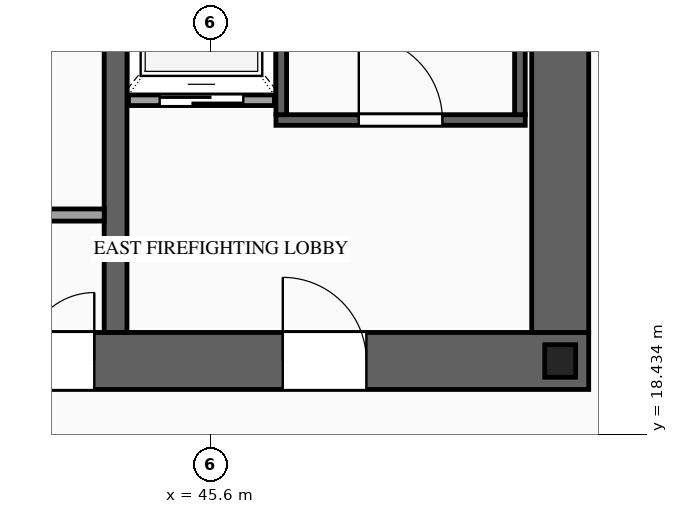
"""IFC4 building model, lengths in metres.
Left out: names, types, materials, properties, quantities, classifications, styles, units other than length and angle.
Written with IfcOpenShell. Run it as: python <this file> out.ifc"""

import sys

from ifc_helpers import new_model, si_unit, direction, frame, frame_2d, origin, origin_2d, place, context, subcontext, project, spatial, rectangle, i_section, extrude, source, transform, mapped, element, fill, save


model = new_model("IFC4")
c1 = context("Model", 3, precision=1e-05, world=origin(), true_north=direction((0.0, 1.0)))
c2 = subcontext(c1, "Body", "Model", "MODEL_VIEW")
j1 = project(units=[si_unit("LENGTHUNIT", "METRE"), si_unit("PLANEANGLEUNIT", "RADIAN")], contexts=[c1])
p1 = place(None, origin())
s1 = spatial("IfcSite", under=j1, at=p1, CompositionType="ELEMENT")
p2 = place(p1, origin())
s2 = spatial("IfcBuilding", under=s1, at=p2, CompositionType="ELEMENT")
p3 = place(p2, frame((0.0, 0.0, 126.2)))
s3 = spatial("IfcBuildingStorey", under=s2, at=p3, CompositionType="ELEMENT", Elevation=126.2)
p4 = place(p3, frame((23.425, 19.4, 0.0), z_axis=(0.0, 0.0, 1.0), x_axis=(1.0, 0.0, 0.0)))
e1 = element("IfcWall", 1, at=p4, inside=s3, PredefinedType="SHEAR", context=c2, shape_type="SweptSolid", body=[
    extrude(rectangle(XDim=27.15, YDim=0.75, at=frame_2d((13.575, 0.0))), origin(), (0.0, 0.0, 1.0), 3.6),
])
p5 = place(p4, frame((2.025, 0.0, 0.0)))
e2 = element("IfcOpeningElement", 2, at=p5, cuts=e1, PredefinedType="OPENING", context=c2, shape_type="SweptSolid", body=[
    extrude(rectangle(XDim=1.1, YDim=2.2, at=frame_2d((0.55, 1.1))), frame((0.0, 0.39, 0.0), z_axis=(0.0, -1.0, 0.0), x_axis=(1.0, 0.0, 0.0)), (0.0, 0.0, 1.0), 0.78),
])
p6 = place(p4, frame((9.925, 0.0, 0.0)))
e3 = element("IfcOpeningElement", 3, at=p6, cuts=e1, PredefinedType="OPENING", context=c2, shape_type="SweptSolid", body=[
    extrude(rectangle(XDim=1.1, YDim=2.2, at=frame_2d((0.55, 1.1))), frame((0.0, 0.39, 0.0), z_axis=(0.0, -1.0, 0.0), x_axis=(1.0, 0.0, 0.0)), (0.0, 0.0, 1.0), 0.78),
])
p7 = place(p4, frame((23.125, 0.0, 0.0)))
e4 = element("IfcOpeningElement", 4, at=p7, cuts=e1, PredefinedType="OPENING", context=c2, shape_type="SweptSolid", body=[
    extrude(rectangle(XDim=1.1, YDim=2.2, at=frame_2d((0.55, 1.1))), frame((0.0, 0.39, 0.0), z_axis=(0.0, -1.0, 0.0), x_axis=(1.0, 0.0, 0.0)), (0.0, 0.0, 1.0), 0.78),
])
p8 = place(p4, frame((19.745, 0.0, 0.0)))
e5 = element("IfcOpeningElement", 5, at=p8, cuts=e1, PredefinedType="OPENING", context=c2, shape_type="SweptSolid", body=[
    extrude(rectangle(XDim=0.9, YDim=2.15, at=frame_2d((0.45, 1.075))), frame((0.0, 0.39, 0.0), z_axis=(0.0, -1.0, 0.0), x_axis=(1.0, 0.0, 0.0)), (0.0, 0.0, 1.0), 0.78),
])
p9 = place(p4, frame((18.305, 0.0, 0.0)))
e6 = element("IfcOpeningElement", 6, at=p9, cuts=e1, PredefinedType="OPENING", context=c2, shape_type="SweptSolid", body=[
    extrude(rectangle(XDim=0.9, YDim=2.15, at=frame_2d((0.45, 1.075))), frame((0.0, 0.39, 0.0), z_axis=(0.0, -1.0, 0.0), x_axis=(1.0, 0.0, 0.0)), (0.0, 0.0, 1.0), 0.78),
])
m1 = source(origin(), c2, "Body", "SweptSolid", [
    extrude(rectangle(XDim=12.05, YDim=0.75, at=frame_2d((6.025, 0.0))), origin(), (0.0, 0.0, 1.0), 3.6),
])
p10 = place(p3, frame((50.2, 19.775, 0.0), z_axis=(0.0, 0.0, 1.0), x_axis=(0.0, 1.0, 0.0)))
e7 = element("IfcWall", 7, at=p10, inside=s3, PredefinedType="SHEAR", context=c2, shape_type="MappedRepresentation", body=[
    mapped(m1, transform((0.0, 0.0, 0.0), scale=1.0)),
])
m2 = source(origin(), c2, "Body", "SweptSolid", [
    extrude(rectangle(XDim=12.05, YDim=0.3, at=frame_2d((6.025, 0.0))), origin(), (0.0, 0.0, 1.0), 3.6),
])
p11 = place(p3, frame((44.35, 19.775, 0.0), z_axis=(0.0, 0.0, 1.0), x_axis=(0.0, 1.0, 0.0)))
e8 = element("IfcWall", 8, at=p11, inside=s3, PredefinedType="SOLIDWALL", context=c2, shape_type="MappedRepresentation", body=[
    mapped(m2, transform((0.0, 0.0, 0.0), scale=1.0)),
])
m3 = source(origin(), c2, "Body", "SweptSolid", [
    extrude(i_section(OverallWidth=0.407, OverallDepth=0.428, WebThickness=0.02, FlangeThickness=0.035, at=origin_2d()), origin(), (0.0, 0.0, 1.0), 3.6),
])
p12 = place(p3, frame((50.2, 19.4, 0.0), z_axis=(0.0, 0.0, 1.0), x_axis=(1.0, 0.0, 0.0)))
e9 = element("IfcColumn", 9, at=p12, inside=s3, PredefinedType="COLUMN", context=c2, shape_type="MappedRepresentation", body=[
    mapped(m3, transform((0.0, 0.0, 0.0), scale=1.0)),
])
p13 = place(p3, frame((44.52, 22.83, 0.0), z_axis=(0.0, 0.0, 1.0), x_axis=(1.0, 0.0, 0.0)))
e10 = element("IfcWall", 10, at=p13, inside=s3, PredefinedType="SOLIDWALL", context=c2, shape_type="SweptSolid", body=[
    extrude(rectangle(XDim=1.92, YDim=0.14, at=frame_2d((0.96, 0.0))), origin(), (0.0, 0.0, 1.0), 3.32),
])
p14 = place(p13, frame((0.41, 0.0, 0.0)))
e11 = element("IfcOpeningElement", 11, at=p14, cuts=e10, PredefinedType="OPENING", context=c2, shape_type="SweptSolid", body=[
    extrude(rectangle(XDim=1.1, YDim=2.2, at=frame_2d((0.55, 1.1))), frame((0.0, 0.085, 0.0), z_axis=(0.0, -1.0, 0.0), x_axis=(1.0, 0.0, 0.0)), (0.0, 0.0, 1.0), 0.17),
])
p15 = place(p3, frame((46.46, 22.57, 0.0), z_axis=(0.0, 0.0, 1.0), x_axis=(1.0, 0.0, 0.0)))
e12 = element("IfcWall", 12, at=p15, inside=s3, PredefinedType="SOLIDWALL", context=c2, shape_type="SweptSolid", body=[
    extrude(rectangle(XDim=3.28, YDim=0.14, at=frame_2d((1.64, 0.0))), origin(), (0.0, 0.0, 1.0), 3.32),
])
p16 = place(p15, frame((1.09, 0.0, 0.0)))
e13 = element("IfcOpeningElement", 13, at=p16, cuts=e12, PredefinedType="OPENING", context=c2, shape_type="SweptSolid", body=[
    extrude(rectangle(XDim=1.1, YDim=2.2, at=frame_2d((0.55, 1.1))), frame((0.0, 0.085, 0.0), z_axis=(0.0, -1.0, 0.0), x_axis=(1.0, 0.0, 0.0)), (0.0, 0.0, 1.0), 0.17),
])
m4 = source(origin(), c2, "Body", "SweptSolid", [
    extrude(rectangle(XDim=8.94, YDim=0.14, at=frame_2d((4.47, 0.0))), origin(), (0.0, 0.0, 1.0), 3.32),
])
for number, where, z_axis, x_axis in (
    (14, (46.53, 22.64, 0.0), (0.0, 0.0, 1.0), (0.0, 1.0, 0.0)),
    (15, (49.67, 22.64, 0.0), (0.0, 0.0, 1.0), (0.0, 1.0, 0.0)),
):
    element("IfcWall", number, at=place(p3, frame(where, z_axis=z_axis, x_axis=x_axis)), inside=s3, PredefinedType="SOLIDWALL", context=c2, shape_type="MappedRepresentation", body=[
        mapped(m4, transform((0.0, 0.0, 0.0), scale=1.0)),
    ])
m5 = source(origin(), c2, "Body", "SweptSolid", [
    extrude(rectangle(XDim=1.17, YDim=0.16, at=frame_2d((0.585, 0.0))), origin(), (0.0, 0.0, 1.0), 3.32),
])
p17 = place(p3, frame((43.03, 21.32, 0.0), z_axis=(0.0, 0.0, 1.0), x_axis=(1.0, 0.0, 0.0)))
e16 = element("IfcWall", 16, at=p17, inside=s3, PredefinedType="PARTITIONING", context=c2, shape_type="MappedRepresentation", body=[
    mapped(m5, transform((0.0, 0.0, 0.0), scale=1.0)),
])
m6 = source(origin(), c2, "Body", "SweptSolid", [
    extrude(rectangle(XDim=1.1, YDim=2.2, at=frame_2d((0.55, 1.1))), frame((0.0, 0.025, 0.0), z_axis=(0.0, -1.0, 0.0), x_axis=(1.0, 0.0, 0.0)), (0.0, 0.0, 1.0), 0.05),
])
p18 = place(p14, origin())
e17 = element("IfcDoor", 17, at=p18, inside=s3, OperationType="SLIDING_TO_RIGHT", PredefinedType="DOOR", context=c2, shape_type="MappedRepresentation", body=[
    mapped(m6, transform((0.0, 0.0, 0.0), scale=1.0)),
])
fill(e11, e17)
m7 = source(origin(), c2, "Body", "SweptSolid", [
    extrude(rectangle(XDim=1.1, YDim=2.2, at=frame_2d((0.55, 1.1))), frame((0.0, 0.025, 0.0), z_axis=(0.0, -1.0, 0.0), x_axis=(1.0, 0.0, 0.0)), (0.0, 0.0, 1.0), 0.05),
])
p19 = place(p16, origin())
e18 = element("IfcDoor", 18, at=p19, inside=s3, OperationType="SINGLE_SWING_LEFT", PredefinedType="DOOR", context=c2, shape_type="MappedRepresentation", body=[
    mapped(m7, transform((0.0, 0.0, 0.0), scale=1.0)),
])
fill(e13, e18)
p20 = place(p7, origin())
e19 = element("IfcDoor", 19, at=p20, inside=s3, OperationType="SINGLE_SWING_LEFT", PredefinedType="DOOR", context=c2, shape_type="MappedRepresentation", body=[
    mapped(m7, transform((0.0, 0.0, 0.0), scale=1.0)),
])
fill(e4, e19)
m8 = source(origin(), c2, "Body", "SweptSolid", [
    extrude(rectangle(XDim=0.9, YDim=2.15, at=frame_2d((0.45, 1.075))), frame((0.0, 0.025, 0.0), z_axis=(0.0, -1.0, 0.0), x_axis=(1.0, 0.0, 0.0)), (0.0, 0.0, 1.0), 0.05),
])
p21 = place(p8, origin())
e20 = element("IfcDoor", 20, at=p21, inside=s3, OperationType="SINGLE_SWING_RIGHT", PredefinedType="DOOR", context=c2, shape_type="MappedRepresentation", body=[
    mapped(m8, transform((0.0, 0.0, 0.0), scale=1.0)),
])
fill(e5, e20)
save(model, sys.argv[1])
